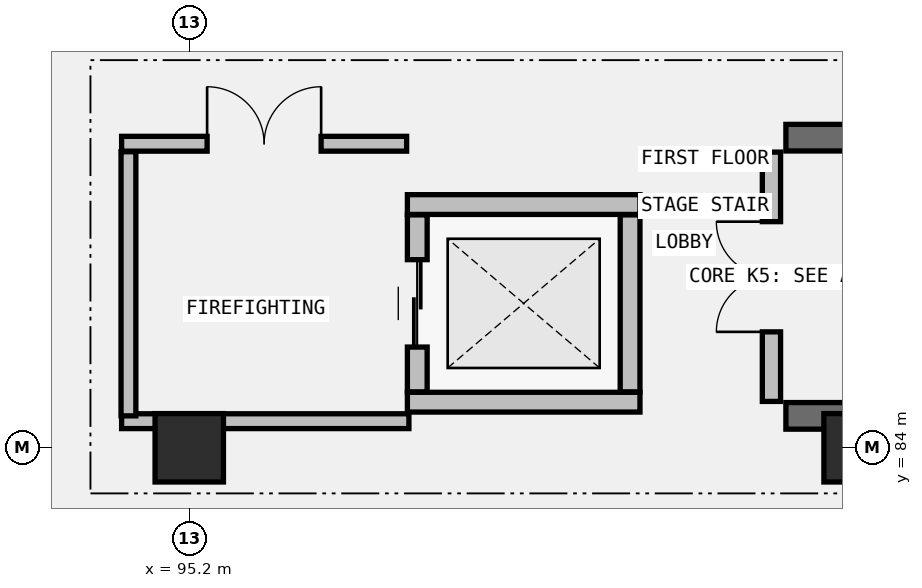
"""IFC4 building model, lengths in metres.
Left out: names, types, materials, properties, quantities, classifications, styles, units other than length and angle.
Written with IfcOpenShell. Run it as: python <this file> out.ifc"""

import sys

from ifc_helpers import new_model, si_unit, direction, frame, frame_2d, origin, origin_2d, place, context, subcontext, project, spatial, rectangle, extrude, element, fill, save


model = new_model("IFC4")
c1 = context("Model", 3, precision=1e-05, world=origin(), true_north=direction((0.0, 1.0)))
c2 = subcontext(c1, "Body", "Model", "MODEL_VIEW")
j1 = project(units=[si_unit("LENGTHUNIT", "METRE"), si_unit("PLANEANGLEUNIT", "RADIAN")], contexts=[c1])
p1 = place(None, origin())
s1 = spatial("IfcSite", under=j1, at=p1, CompositionType="ELEMENT")
p2 = place(p1, origin())
s2 = spatial("IfcBuilding", under=s1, at=p2, CompositionType="ELEMENT")
p3 = place(p2, frame((0.0, 0.0, 5.4)))
s3 = spatial("IfcBuildingStorey", under=s2, at=p3, CompositionType="ELEMENT", Elevation=5.4)
for number, where, z_axis, x_axis in (
    (1, (95.2, 84.0, 0.0), (0.0, 0.0, 1.0), (1.0, 0.0, 0.0)),
    (2, (104.0, 84.0, 0.0), (0.0, 0.0, 1.0), (1.0, 0.0, 0.0)),
):
    element("IfcColumn", number, at=place(p3, frame(where, z_axis=z_axis, x_axis=x_axis)), inside=s3, PredefinedType="COLUMN", context=c2, shape_type="SweptSolid", body=[
        extrude(rectangle(XDim=0.9, YDim=0.9, at=origin_2d()), origin(), (0.0, 0.0, 1.0), 4.6),
    ])
for number, where, z_axis, x_axis in (
    (3, (103.05, 84.42, 0.0), (0.0, 0.0, 1.0), (1.0, 0.0, 0.0)),
    (4, (111.2, 88.08, 0.0), (0.0, 0.0, 1.0), (-1.0, 0.0, 0.0)),
):
    element("IfcWall", number, at=place(p3, frame(where, z_axis=z_axis, x_axis=x_axis)), inside=s3, PredefinedType="SHEAR", context=c2, shape_type="SweptSolid", body=[
        extrude(rectangle(XDim=8.15, YDim=0.35, at=frame_2d((4.075, 0.0))), origin(), (0.0, 0.0, 1.0), 4.36),
    ])
p4 = place(p3, frame((102.86, 84.61, 0.0), z_axis=(0.0, 0.0, 1.0), x_axis=(0.0, 1.0, 0.0)))
e5 = element("IfcWall", 5, at=p4, inside=s3, PredefinedType="STANDARD", context=c2, shape_type="SweptSolid", body=[
    extrude(rectangle(XDim=3.28, YDim=0.24, at=frame_2d((1.64, 0.0))), origin(), (0.0, 0.0, 1.0), 4.36),
])
p5 = place(p4, frame((0.915, 0.0, 0.0)))
e6 = element("IfcOpeningElement", 6, at=p5, cuts=e5, PredefinedType="OPENING", context=c2, shape_type="SweptSolid", body=[
    extrude(rectangle(XDim=1.45, YDim=2.2, at=frame_2d((0.725, 1.1))), frame((0.0, 0.13, 0.0), z_axis=(0.0, -1.0, 0.0), x_axis=(1.0, 0.0, 0.0)), (0.0, 0.0, 1.0), 0.26),
])
for number, where, z_axis, x_axis in (
    (7, (98.07, 84.6, 0.0), (0.0, 0.0, 1.0), (1.0, 0.0, 0.0)),
    (8, (98.07, 87.2, 0.0), (0.0, 0.0, 1.0), (1.0, 0.0, 0.0)),
):
    element("IfcWall", number, at=place(p3, frame(where, z_axis=z_axis, x_axis=x_axis)), inside=s3, PredefinedType="STANDARD", context=c2, shape_type="SweptSolid", body=[
        extrude(rectangle(XDim=3.06, YDim=0.26, at=frame_2d((1.53, 0.0))), origin(), (0.0, 0.0, 1.0), 4.36),
    ])
p6 = place(p3, frame((98.2, 84.736, 0.0), z_axis=(0.0, 0.0, 1.0), x_axis=(0.0, 1.0, 0.0)))
e9 = element("IfcWall", 9, at=p6, inside=s3, PredefinedType="STANDARD", context=c2, shape_type="SweptSolid", body=[
    extrude(rectangle(XDim=2.328, YDim=0.26, at=frame_2d((1.164, 0.0))), origin(), (0.0, 0.0, 1.0), 4.36),
])
p7 = place(p6, frame((0.589, 0.0, 0.0)))
e10 = element("IfcOpeningElement", 10, at=p7, cuts=e9, PredefinedType="OPENING", context=c2, shape_type="SweptSolid", body=[
    extrude(rectangle(XDim=1.15, YDim=2.15, at=frame_2d((0.575, 1.075))), frame((0.0, 0.14, 0.0), z_axis=(0.0, -1.0, 0.0), x_axis=(1.0, 0.0, 0.0)), (0.0, 0.0, 1.0), 0.28),
])
p8 = place(p3, frame((101.0, 84.736, 0.0), z_axis=(0.0, 0.0, 1.0), x_axis=(0.0, 1.0, 0.0)))
e11 = element("IfcWall", 11, at=p8, inside=s3, PredefinedType="STANDARD", context=c2, shape_type="SweptSolid", body=[
    extrude(rectangle(XDim=2.328, YDim=0.26, at=frame_2d((1.164, 0.0))), origin(), (0.0, 0.0, 1.0), 4.36),
])
p9 = place(p3, frame((94.31, 84.35, 0.0), z_axis=(0.0, 0.0, 1.0), x_axis=(1.0, 0.0, 0.0)))
e12 = element("IfcWall", 12, at=p9, inside=s3, PredefinedType="PARTITIONING", context=c2, shape_type="SweptSolid", body=[
    extrude(rectangle(XDim=3.78, YDim=0.195, at=frame_2d((1.89, 0.0))), origin(), (0.0, 0.0, 1.0), 4.36),
])
p10 = place(p3, frame((94.4, 84.42, 0.0), z_axis=(0.0, 0.0, 1.0), x_axis=(0.0, 1.0, 0.0)))
e13 = element("IfcWall", 13, at=p10, inside=s3, PredefinedType="PARTITIONING", context=c2, shape_type="SweptSolid", body=[
    extrude(rectangle(XDim=3.475, YDim=0.195, at=frame_2d((1.738, 0.0))), origin(), (0.0, 0.0, 1.0), 4.36),
])
p11 = place(p3, frame((94.31, 88.0, 0.0), z_axis=(0.0, 0.0, 1.0), x_axis=(1.0, 0.0, 0.0)))
e14 = element("IfcWall", 14, at=p11, inside=s3, PredefinedType="PARTITIONING", context=c2, shape_type="SweptSolid", body=[
    extrude(rectangle(XDim=3.75, YDim=0.195, at=frame_2d((1.875, 0.0))), origin(), (0.0, 0.0, 1.0), 4.36),
])
p12 = place(p11, frame((1.125, 0.0, 0.0)))
e15 = element("IfcOpeningElement", 15, at=p12, cuts=e14, PredefinedType="OPENING", context=c2, shape_type="SweptSolid", body=[
    extrude(rectangle(XDim=1.5, YDim=2.2, at=frame_2d((0.75, 1.1))), frame((0.0, 0.107, 0.0), z_axis=(0.0, -1.0, 0.0), x_axis=(1.0, 0.0, 0.0)), (0.0, 0.0, 1.0), 0.215),
])
p13 = place(p5, origin())
e16 = element("IfcDoor", 16, at=p13, inside=s3, OperationType="DOUBLE_DOOR_SINGLE_SWING", PredefinedType="DOOR", context=c2, shape_type="SweptSolid", body=[
    extrude(rectangle(XDim=1.45, YDim=2.2, at=frame_2d((0.725, 1.1))), frame((0.0, 0.025, 0.0), z_axis=(0.0, -1.0, 0.0), x_axis=(1.0, 0.0, 0.0)), (0.0, 0.0, 1.0), 0.05),
])
fill(e6, e16)
p14 = place(p7, origin())
e17 = element("IfcDoor", 17, at=p14, inside=s3, OperationType="SLIDING_TO_LEFT", PredefinedType="DOOR", context=c2, shape_type="SweptSolid", body=[
    extrude(rectangle(XDim=1.15, YDim=2.15, at=frame_2d((0.575, 1.075))), frame((0.0, 0.025, 0.0), z_axis=(0.0, -1.0, 0.0), x_axis=(1.0, 0.0, 0.0)), (0.0, 0.0, 1.0), 0.05),
])
fill(e10, e17)
p15 = place(p12, origin())
e18 = element("IfcDoor", 18, at=p15, inside=s3, OperationType="DOUBLE_DOOR_SINGLE_SWING", PredefinedType="DOOR", context=c2, shape_type="SweptSolid", body=[
    extrude(rectangle(XDim=1.5, YDim=2.2, at=frame_2d((0.75, 1.1))), frame((0.0, 0.025, 0.0), z_axis=(0.0, -1.0, 0.0), x_axis=(1.0, 0.0, 0.0)), (0.0, 0.0, 1.0), 0.05),
])
fill(e15, e18)
save(model, sys.argv[1])
